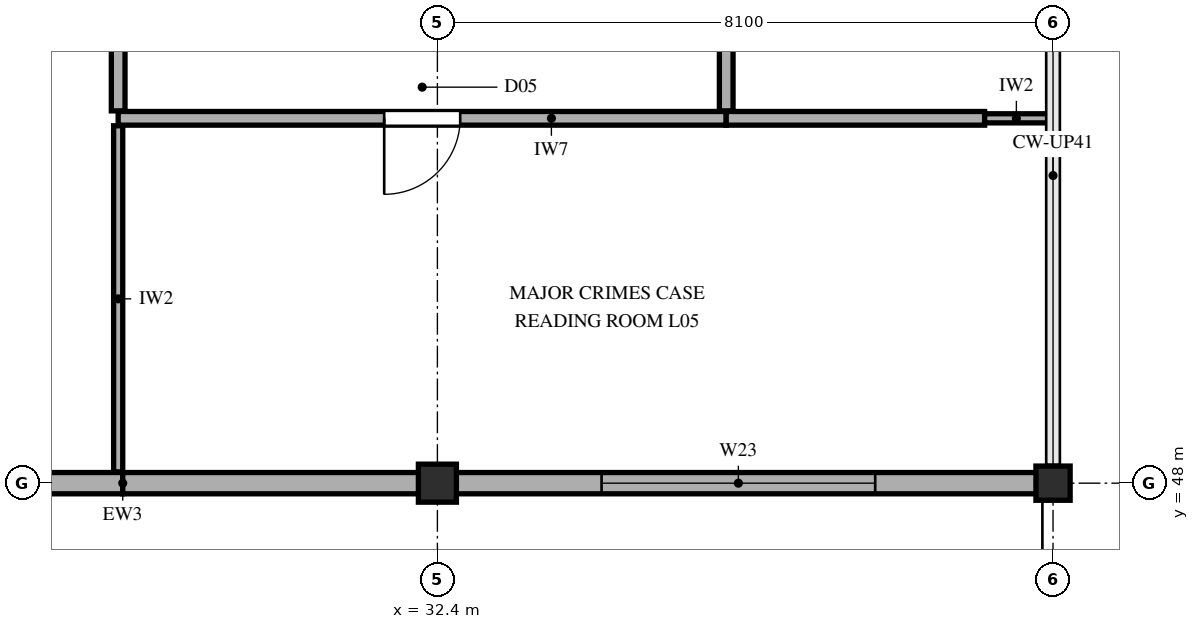
"""IFC4 building model, lengths in metres.
Left out: names, types, materials, properties, quantities, classifications, styles, units other than length and angle.
Written with IfcOpenShell. Run it as: python <this file> out.ifc"""

import sys

from ifc_helpers import new_model, si_unit, direction, frame, frame_2d, origin, origin_2d, place, context, subcontext, project, spatial, rectangle, extrude, element, fill, save


model = new_model("IFC4")
c1 = context("Model", 3, precision=1e-05, world=origin(), true_north=direction((0.0, 1.0)))
c2 = subcontext(c1, "Body", "Model", "MODEL_VIEW")
j1 = project(units=[si_unit("LENGTHUNIT", "METRE"), si_unit("PLANEANGLEUNIT", "RADIAN")], contexts=[c1])
p1 = place(None, origin())
s1 = spatial("IfcSite", under=j1, at=p1, CompositionType="ELEMENT")
p2 = place(p1, origin())
s2 = spatial("IfcBuilding", under=s1, at=p2, CompositionType="ELEMENT")
p3 = place(p2, frame((0.0, 0.0, 24.9)))
s3 = spatial("IfcBuildingStorey", under=s2, at=p3, CompositionType="ELEMENT", Elevation=24.9)
p4 = place(p3, frame((32.4, 48.0, 0.0), z_axis=(0.0, 0.0, 1.0), x_axis=(1.0, 0.0, 0.0)))
e1 = element("IfcColumn", 1, at=p4, inside=s3, PredefinedType="COLUMN", context=c2, shape_type="SweptSolid", body=[
    extrude(rectangle(XDim=0.5, YDim=0.5, at=origin_2d()), origin(), (0.0, 0.0, 1.0), 3.86),
])
p5 = place(p3, frame((40.5, 48.0, 0.0), z_axis=(0.0, 0.0, 1.0), x_axis=(1.0, 0.0, 0.0)))
e2 = element("IfcColumn", 2, at=p5, inside=s3, PredefinedType="COLUMN", context=c2, shape_type="SweptSolid", body=[
    extrude(rectangle(XDim=0.45, YDim=0.45, at=origin_2d()), origin(), (0.0, 0.0, 1.0), 3.96),
])
p6 = place(p3, frame((16.2, 48.0, 0.0), z_axis=(0.0, 0.0, 1.0), x_axis=(1.0, 0.0, 0.0)))
e3 = element("IfcWall", 3, at=p6, inside=s3, PredefinedType="SOLIDWALL", context=c2, shape_type="SweptSolid", body=[
    extrude(rectangle(XDim=12.06, YDim=0.28, at=frame_2d((6.03, 0.0))), origin(), (0.0, 0.0, 1.0), 3.302),
])
p7 = place(p6, frame((5.2, 0.0, 0.0)))
e4 = element("IfcOpeningElement", 4, at=p7, cuts=e3, PredefinedType="OPENING", context=c2, shape_type="SweptSolid", body=[
    extrude(rectangle(XDim=1.5, YDim=2.3, at=frame_2d((0.75, 1.15))), frame((0.0, 0.15, 0.0), z_axis=(0.0, -1.0, 0.0), x_axis=(1.0, 0.0, 0.0)), (0.0, 0.0, 1.0), 0.3),
])
p8 = place(p3, frame((28.26, 48.0, 0.0), z_axis=(0.0, 0.0, 1.0), x_axis=(1.0, 0.0, 0.0)))
e5 = element("IfcWall", 5, at=p8, inside=s3, PredefinedType="SOLIDWALL", context=c2, shape_type="SweptSolid", body=[
    extrude(rectangle(XDim=12.06, YDim=0.28, at=frame_2d((6.03, 0.0))), origin(), (0.0, 0.0, 1.0), 3.302),
])
p9 = place(p8, frame((6.3, 0.0, 0.95)))
e6 = element("IfcOpeningElement", 6, at=p9, cuts=e5, PredefinedType="OPENING", context=c2, shape_type="SweptSolid", body=[
    extrude(rectangle(XDim=3.6, YDim=0.9, at=frame_2d((1.8, 0.45))), frame((0.0, 0.15, 0.0), z_axis=(0.0, -1.0, 0.0), x_axis=(1.0, 0.0, 0.0)), (0.0, 0.0, 1.0), 0.3),
])
p10 = place(p3, frame((28.2, 52.8, 0.0), z_axis=(0.0, 0.0, 1.0), x_axis=(1.0, 0.0, 0.0)))
e7 = element("IfcWall", 7, at=p10, inside=s3, PredefinedType="PARTITIONING", context=c2, shape_type="SweptSolid", body=[
    extrude(rectangle(XDim=8.0, YDim=0.18, at=frame_2d((4.0, 0.0))), origin(), (0.0, 0.0, 1.0), 3.96),
])
p11 = place(p10, frame((3.5, 0.0, 0.0)))
e8 = element("IfcOpeningElement", 8, at=p11, cuts=e7, PredefinedType="OPENING", context=c2, shape_type="SweptSolid", body=[
    extrude(rectangle(XDim=1.0, YDim=2.2, at=frame_2d((0.5, 1.1))), frame((0.0, 0.1, 0.0), z_axis=(0.0, -1.0, 0.0), x_axis=(1.0, 0.0, 0.0)), (0.0, 0.0, 1.0), 0.2),
])
p12 = place(p3, frame((36.2, 52.8, 0.0), z_axis=(0.0, 0.0, 1.0), x_axis=(1.0, 0.0, 0.0)))
e9 = element("IfcWall", 9, at=p12, inside=s3, PredefinedType="PARTITIONING", context=c2, shape_type="SweptSolid", body=[
    extrude(rectangle(XDim=3.4, YDim=0.18, at=frame_2d((1.7, 0.0))), origin(), (0.0, 0.0, 1.0), 3.96),
])
p13 = place(p3, frame((39.6, 52.8, 0.0), z_axis=(0.0, 0.0, 1.0), x_axis=(1.0, 0.0, 0.0)))
e10 = element("IfcWall", 10, at=p13, inside=s3, PredefinedType="PARTITIONING", context=c2, shape_type="SweptSolid", body=[
    extrude(rectangle(XDim=0.835, YDim=0.12, at=frame_2d((0.417, 0.0))), origin(), (0.0, 0.0, 1.0), 3.96),
])
p14 = place(p3, frame((28.2, 48.148, 0.0), z_axis=(0.0, 0.0, 1.0), x_axis=(0.0, 1.0, 0.0)))
e11 = element("IfcWall", 11, at=p14, inside=s3, PredefinedType="PARTITIONING", context=c2, shape_type="SweptSolid", body=[
    extrude(rectangle(XDim=4.554, YDim=0.12, at=frame_2d((2.277, 0.0))), origin(), (0.0, 0.0, 1.0), 3.498),
])
p15 = place(p3, frame((28.2, 52.898, 0.0), z_axis=(0.0, 0.0, 1.0), x_axis=(0.0, 1.0, 0.0)))
e12 = element("IfcWall", 12, at=p15, inside=s3, PredefinedType="PARTITIONING", context=c2, shape_type="SweptSolid", body=[
    extrude(rectangle(XDim=3.774, YDim=0.18, at=frame_2d((1.887, 0.0))), origin(), (0.0, 0.0, 1.0), 3.498),
])
p16 = place(p15, frame((1.387, 0.0, 0.0)))
e13 = element("IfcOpeningElement", 13, at=p16, cuts=e12, PredefinedType="OPENING", context=c2, shape_type="SweptSolid", body=[
    extrude(rectangle(XDim=1.0, YDim=2.2, at=frame_2d((0.5, 1.1))), frame((0.0, 0.1, 0.0), z_axis=(0.0, -1.0, 0.0), x_axis=(1.0, 0.0, 0.0)), (0.0, 0.0, 1.0), 0.2),
])
p17 = place(p3, frame((36.2, 52.898, 0.0), z_axis=(0.0, 0.0, 1.0), x_axis=(0.0, 1.0, 0.0)))
e14 = element("IfcWall", 14, at=p17, inside=s3, PredefinedType="PARTITIONING", context=c2, shape_type="SweptSolid", body=[
    extrude(rectangle(XDim=3.804, YDim=0.18, at=frame_2d((1.902, 0.0))), origin(), (0.0, 0.0, 1.0), 3.96),
])
p18 = place(p17, frame((1.352, 0.0, 0.0)))
e15 = element("IfcOpeningElement", 15, at=p18, cuts=e14, PredefinedType="OPENING", context=c2, shape_type="SweptSolid", body=[
    extrude(rectangle(XDim=1.1, YDim=2.2, at=frame_2d((0.55, 1.1))), frame((0.0, 0.1, 0.0), z_axis=(0.0, -1.0, 0.0), x_axis=(1.0, 0.0, 0.0)), (0.0, 0.0, 1.0), 0.2),
])
p19 = place(p9, origin())
e16 = element("IfcWindow", 16, at=p19, inside=s3, PartitioningType="TRIPLE_PANEL_VERTICAL", PredefinedType="WINDOW", context=c2, shape_type="SweptSolid", body=[
    extrude(rectangle(XDim=3.6, YDim=0.9, at=frame_2d((1.8, 0.45))), frame((0.0, 0.03, 0.0), z_axis=(0.0, -1.0, 0.0), x_axis=(1.0, 0.0, 0.0)), (0.0, 0.0, 1.0), 0.06),
])
fill(e6, e16)
p20 = place(p11, frame((1.0, 0.0, 0.0), z_axis=(0.0, 0.0, 1.0), x_axis=(-1.0, 0.0, 0.0)))
e17 = element("IfcDoor", 17, at=p20, inside=s3, OperationType="SINGLE_SWING_LEFT", PredefinedType="DOOR", context=c2, shape_type="SweptSolid", body=[
    extrude(rectangle(XDim=1.0, YDim=2.2, at=frame_2d((0.5, 1.1))), frame((0.0, 0.025, 0.0), z_axis=(0.0, -1.0, 0.0), x_axis=(1.0, 0.0, 0.0)), (0.0, 0.0, 1.0), 0.05),
])
fill(e8, e17)
save(model, sys.argv[1])
